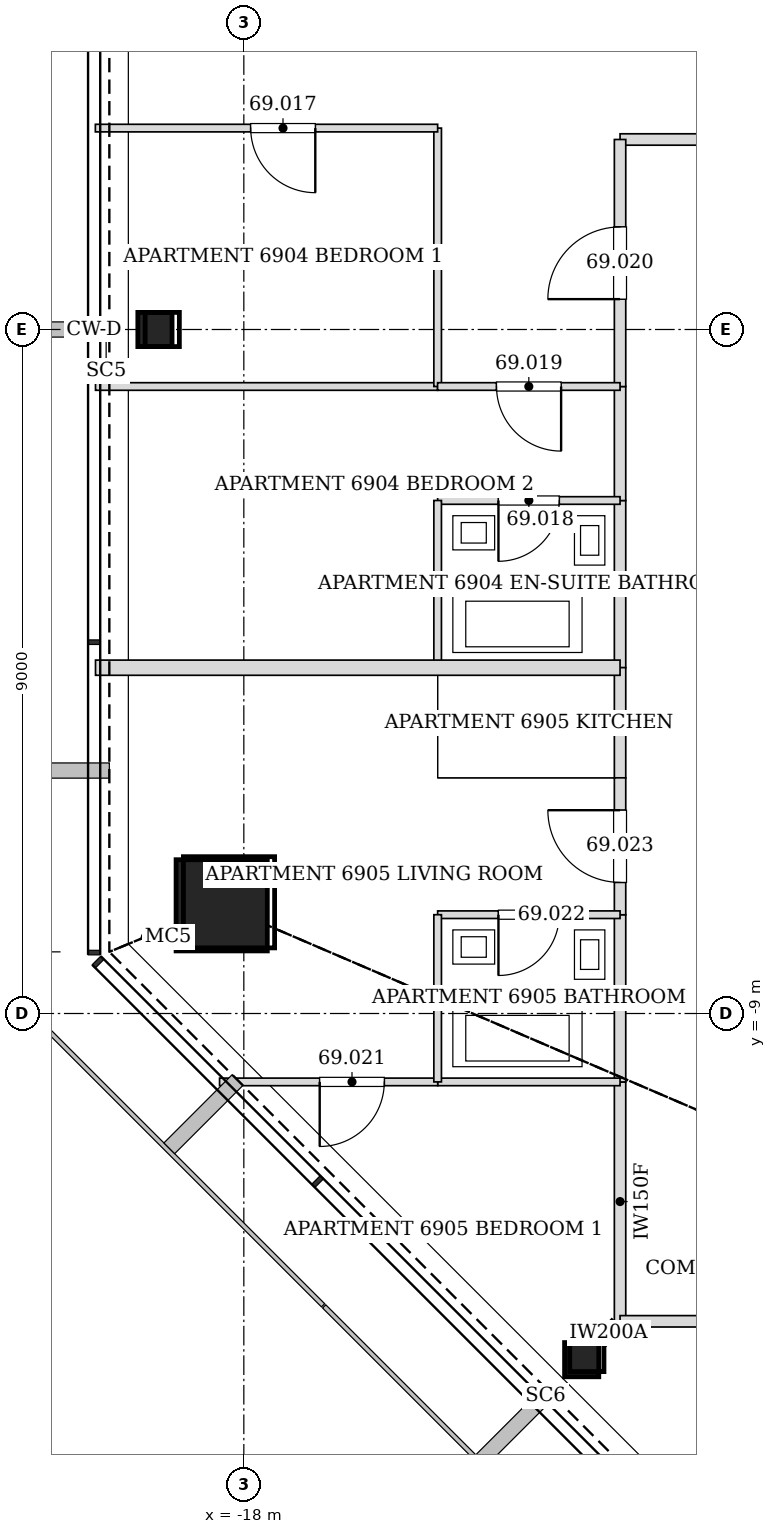
"""IFC4 building model, lengths in metres.
Left out: names, types, materials, properties, quantities, classifications, styles, units other than length and angle.
Written with IfcOpenShell. Run it as: python <this file> out.ifc"""

import sys

from ifc_helpers import new_model, si_unit, direction, frame, frame_2d, origin, origin_2d, place, context, subcontext, project, spatial, rectangle, hollow_rectangle, extrude, element, fill, save


model = new_model("IFC4")
c1 = context("Model", 3, precision=1e-05, world=origin(), true_north=direction((0.0, 1.0)))
c2 = subcontext(c1, "Body", "Model", "MODEL_VIEW")
j1 = project(units=[si_unit("LENGTHUNIT", "METRE"), si_unit("PLANEANGLEUNIT", "RADIAN")], contexts=[c1])
p1 = place(None, origin())
s1 = spatial("IfcSite", under=j1, at=p1, CompositionType="ELEMENT")
p2 = place(p1, origin())
s2 = spatial("IfcBuilding", under=s1, at=p2, CompositionType="ELEMENT")
p3 = place(p2, frame((0.0, 0.0, 284.4)))
s3 = spatial("IfcBuildingStorey", under=s2, at=p3, CompositionType="ELEMENT", Elevation=284.4)
p4 = place(p3, frame((-18.291, -7.576, 0.0), z_axis=(0.028277121884, 0.011698403216, 0.999531666202), x_axis=(-0.382282742426, 0.924045401938, 0.0)))
e1 = element("IfcColumn", 1, at=p4, inside=s3, PredefinedType="COLUMN", context=c2, shape_type="SweptSolid", body=[
    extrude(hollow_rectangle(XDim=1.2, YDim=1.2, WallThickness=0.055, at=origin_2d()), origin(), (0.0, 0.0, 1.0), 3.402),
])
for number, where, z_axis, x_axis in (
    (2, (-19.169, 0.0, 0.0), (0.028, 0.0, 1.0), (0.0, 1.0, 0.0)),
    (3, (-13.555, -13.555, 0.0), (0.02, 0.02, 1.0), (-0.707, 0.707, 0.0)),
):
    element("IfcColumn", number, at=place(p3, frame(where, z_axis=z_axis, x_axis=x_axis)), inside=s3, PredefinedType="COLUMN", context=c2, shape_type="SweptSolid", body=[
        extrude(hollow_rectangle(XDim=0.45, YDim=0.45, WallThickness=0.02, at=origin_2d()), origin(), (0.0, 0.0, 1.0), 3.402),
    ])
p5 = place(p3, frame((-13.05, -2.249, 0.0), z_axis=(0.0, 0.0, 1.0), x_axis=(0.0, -1.0, 0.0)))
e4 = element("IfcWall", 4, at=p5, inside=s3, PredefinedType="PARTITIONING", context=c2, shape_type="SweptSolid", body=[
    extrude(rectangle(XDim=2.202, YDim=0.15, at=frame_2d((1.101, 0.0))), origin(), (0.0, 0.0, 1.0), 3.2),
])
p6 = place(p3, frame((-13.05, -0.749, 0.0), z_axis=(0.0, 0.0, 1.0), x_axis=(0.0, -1.0, 0.0)))
e5 = element("IfcWall", 5, at=p6, inside=s3, PredefinedType="PARTITIONING", context=c2, shape_type="SweptSolid", body=[
    extrude(rectangle(XDim=1.502, YDim=0.15, at=frame_2d((0.751, 0.0))), origin(), (0.0, 0.0, 1.0), 3.2),
])
p7 = place(p3, frame((-11.25, 2.5, 0.0), z_axis=(0.0, 0.0, 1.0), x_axis=(-1.0, 0.0, 0.0)))
e6 = element("IfcWall", 6, at=p7, inside=s3, PredefinedType="PARTITIONING", context=c2, shape_type="SweptSolid", body=[
    extrude(rectangle(XDim=1.8, YDim=0.15, at=frame_2d((0.9, 0.0))), origin(), (0.0, 0.0, 1.0), 3.2),
])
p8 = place(p3, frame((-13.05, 2.5, 0.0), z_axis=(0.0, 0.0, 1.0), x_axis=(0.0, -1.0, 0.0)))
e7 = element("IfcWall", 7, at=p8, inside=s3, PredefinedType="PARTITIONING", context=c2, shape_type="SweptSolid", body=[
    extrude(rectangle(XDim=3.251, YDim=0.15, at=frame_2d((1.625, 0.0))), origin(), (0.0, 0.0, 1.0), 2.349),
])
p9 = place(p8, frame((1.15, 0.0, 0.0)))
e8 = element("IfcOpeningElement", 8, at=p9, cuts=e7, PredefinedType="OPENING", context=c2, shape_type="SweptSolid", body=[
    extrude(rectangle(XDim=0.95, YDim=2.1, at=frame_2d((0.475, 1.05))), frame((0.0, 0.085, 0.0), z_axis=(0.0, -1.0, 0.0), x_axis=(1.0, 0.0, 0.0)), (0.0, 0.0, 1.0), 0.17),
])
p10 = place(p3, frame((-13.05, -9.899, 0.0), z_axis=(0.0, 0.0, 1.0), x_axis=(0.0, -1.0, 0.0)))
e9 = element("IfcWall", 9, at=p10, inside=s3, PredefinedType="PARTITIONING", context=c2, shape_type="SweptSolid", body=[
    extrude(rectangle(XDim=3.151, YDim=0.15, at=frame_2d((1.576, 0.0))), origin(), (0.0, 0.0, 1.0), 2.497),
])
p11 = place(p3, frame((-13.05, -7.699, 0.0), z_axis=(0.0, 0.0, 1.0), x_axis=(0.0, -1.0, 0.0)))
e10 = element("IfcWall", 10, at=p11, inside=s3, PredefinedType="PARTITIONING", context=c2, shape_type="SweptSolid", body=[
    extrude(rectangle(XDim=2.202, YDim=0.15, at=frame_2d((1.101, 0.0))), origin(), (0.0, 0.0, 1.0), 2.497),
])
p12 = place(p3, frame((-13.05, -4.449, 0.0), z_axis=(0.0, 0.0, 1.0), x_axis=(0.0, -1.0, 0.0)))
e11 = element("IfcWall", 11, at=p12, inside=s3, PredefinedType="PARTITIONING", context=c2, shape_type="SweptSolid", body=[
    extrude(rectangle(XDim=1.452, YDim=0.15, at=frame_2d((0.726, 0.0))), origin(), (0.0, 0.0, 1.0), 3.2),
])
p13 = place(p3, frame((-13.05, -5.899, 0.0), z_axis=(0.0, 0.0, 1.0), x_axis=(0.0, -1.0, 0.0)))
e12 = element("IfcWall", 12, at=p13, inside=s3, PredefinedType="PARTITIONING", context=c2, shape_type="SweptSolid", body=[
    extrude(rectangle(XDim=1.802, YDim=0.15, at=frame_2d((0.901, 0.0))), origin(), (0.0, 0.0, 1.0), 3.2),
])
p14 = place(p13, frame((0.426, 0.0, 0.0)))
e13 = element("IfcOpeningElement", 13, at=p14, cuts=e12, PredefinedType="OPENING", context=c2, shape_type="SweptSolid", body=[
    extrude(rectangle(XDim=0.95, YDim=2.1, at=frame_2d((0.475, 1.05))), frame((0.0, 0.085, 0.0), z_axis=(0.0, -1.0, 0.0), x_axis=(1.0, 0.0, 0.0)), (0.0, 0.0, 1.0), 0.17),
])
p15 = place(p3, frame((-13.05, -13.05, 0.0), z_axis=(0.0, 0.0, 1.0), x_axis=(1.0, 0.0, 0.0)))
e14 = element("IfcWall", 14, at=p15, inside=s3, PredefinedType="PARTITIONING", context=c2, shape_type="SweptSolid", body=[
    extrude(rectangle(XDim=4.101, YDim=0.15, at=frame_2d((2.051, 0.0))), origin(), (0.0, 0.0, 1.0), 2.497),
])
p16 = place(p3, frame((-19.951, -0.75, 0.0), z_axis=(0.0, 0.0, 1.0), x_axis=(1.0, 0.0, 0.0)))
e15 = element("IfcWall", 15, at=p16, inside=s3, PredefinedType="PARTITIONING", context=c2, shape_type="SweptSolid", body=[
    extrude(rectangle(XDim=4.501, YDim=0.1, at=frame_2d((2.251, 0.0))), origin(), (0.0, 0.0, 1.0), 2.591),
])
p17 = place(p3, frame((-15.45, -0.75, 0.0), z_axis=(0.0, 0.0, 1.0), x_axis=(0.0, 1.0, 0.0)))
e16 = element("IfcWall", 16, at=p17, inside=s3, PredefinedType="PARTITIONING", context=c2, shape_type="SweptSolid", body=[
    extrude(rectangle(XDim=3.4, YDim=0.1, at=frame_2d((1.7, 0.0))), origin(), (0.0, 0.0, 1.0), 2.349),
])
p18 = place(p3, frame((-15.45, 2.65, 0.0), z_axis=(0.0, 0.0, 1.0), x_axis=(-1.0, 0.0, 0.0)))
e17 = element("IfcWall", 17, at=p18, inside=s3, PredefinedType="PARTITIONING", context=c2, shape_type="SweptSolid", body=[
    extrude(rectangle(XDim=4.503, YDim=0.1, at=frame_2d((2.252, 0.0))), origin(), (0.0, 0.0, 1.0), 2.591),
])
p19 = place(p18, frame((1.61, 0.0, 0.0)))
e18 = element("IfcOpeningElement", 18, at=p19, cuts=e17, PredefinedType="OPENING", context=c2, shape_type="SweptSolid", body=[
    extrude(rectangle(XDim=0.85, YDim=2.1, at=frame_2d((0.425, 1.05))), frame((0.0, 0.06, 0.0), z_axis=(0.0, -1.0, 0.0), x_axis=(1.0, 0.0, 0.0)), (0.0, 0.0, 1.0), 0.12),
])
p20 = place(p3, frame((-13.05, -2.25, 0.0), z_axis=(0.0, 0.0, 1.0), x_axis=(-1.0, 0.0, 0.0)))
e19 = element("IfcWall", 19, at=p20, inside=s3, PredefinedType="PARTITIONING", context=c2, shape_type="SweptSolid", body=[
    extrude(rectangle(XDim=2.4, YDim=0.1, at=frame_2d((1.2, 0.0))), origin(), (0.0, 0.0, 1.0), 2.591),
])
p21 = place(p20, frame((0.8, 0.0, 0.0)))
e20 = element("IfcOpeningElement", 20, at=p21, cuts=e19, PredefinedType="OPENING", context=c2, shape_type="SweptSolid", body=[
    extrude(rectangle(XDim=0.8, YDim=2.1, at=frame_2d((0.4, 1.05))), frame((0.0, 0.06, 0.0), z_axis=(0.0, -1.0, 0.0), x_axis=(1.0, 0.0, 0.0)), (0.0, 0.0, 1.0), 0.12),
])
p22 = place(p3, frame((-15.45, -2.25, 0.0), z_axis=(0.0, 0.0, 1.0), x_axis=(0.0, -1.0, 0.0)))
e21 = element("IfcWall", 21, at=p22, inside=s3, PredefinedType="PARTITIONING", context=c2, shape_type="SweptSolid", body=[
    extrude(rectangle(XDim=2.2, YDim=0.1, at=frame_2d((1.1, 0.0))), origin(), (0.0, 0.0, 1.0), 3.2),
])
p23 = place(p3, frame((-13.05, -4.45, 0.0), z_axis=(0.0, 0.0, 1.0), x_axis=(-1.0, 0.0, 0.0)))
e22 = element("IfcWall", 22, at=p23, inside=s3, PredefinedType="PARTITIONING", context=c2, shape_type="SweptSolid", body=[
    extrude(rectangle(XDim=6.901, YDim=0.2, at=frame_2d((3.451, 0.0))), origin(), (0.0, 0.0, 1.0), 2.591),
])
p24 = place(p3, frame((-13.05, -0.75, 0.0), z_axis=(0.0, 0.0, 1.0), x_axis=(-1.0, 0.0, 0.0)))
e23 = element("IfcWall", 23, at=p24, inside=s3, PredefinedType="PARTITIONING", context=c2, shape_type="SweptSolid", body=[
    extrude(rectangle(XDim=2.401, YDim=0.1, at=frame_2d((1.2, 0.0))), origin(), (0.0, 0.0, 1.0), 2.591),
])
p25 = place(p24, frame((0.775, 0.0, 0.0)))
e24 = element("IfcOpeningElement", 24, at=p25, cuts=e23, PredefinedType="OPENING", context=c2, shape_type="SweptSolid", body=[
    extrude(rectangle(XDim=0.85, YDim=2.1, at=frame_2d((0.425, 1.05))), frame((0.0, 0.06, 0.0), z_axis=(0.0, -1.0, 0.0), x_axis=(1.0, 0.0, 0.0)), (0.0, 0.0, 1.0), 0.12),
])
p26 = place(p3, frame((-13.05, -9.9, 0.0), z_axis=(0.0, 0.0, 1.0), x_axis=(-1.0, 0.0, 0.0)))
e25 = element("IfcWall", 25, at=p26, inside=s3, PredefinedType="PARTITIONING", context=c2, shape_type="SweptSolid", body=[
    extrude(rectangle(XDim=2.401, YDim=0.1, at=frame_2d((1.2, 0.0))), origin(), (0.0, 0.0, 1.0), 2.497),
])
p27 = place(p3, frame((-15.449, -9.9, 0.0), z_axis=(0.0, 0.0, 1.0), x_axis=(-1.0, 0.0, 0.0)))
e26 = element("IfcWall", 26, at=p27, inside=s3, PredefinedType="PARTITIONING", context=c2, shape_type="SweptSolid", body=[
    extrude(rectangle(XDim=2.87, YDim=0.1, at=frame_2d((1.435, 0.0))), origin(), (0.0, 0.0, 1.0), 2.74),
])
p28 = place(p27, frame((0.703, 0.0, 0.0)))
e27 = element("IfcOpeningElement", 27, at=p28, cuts=e26, PredefinedType="OPENING", context=c2, shape_type="SweptSolid", body=[
    extrude(rectangle(XDim=0.85, YDim=2.1, at=frame_2d((0.425, 1.05))), frame((0.0, 0.06, 0.0), z_axis=(0.0, -1.0, 0.0), x_axis=(1.0, 0.0, 0.0)), (0.0, 0.0, 1.0), 0.12),
])
p29 = place(p3, frame((-13.314, -13.314, 0.0), z_axis=(0.0, 0.0, 1.0), x_axis=(0.707106781187, 0.707106781187, 0.0)))
e28 = element("IfcWall", 28, at=p29, inside=s3, PredefinedType="PARTITIONING", context=c2, shape_type="SweptSolid", body=[
    extrude(rectangle(XDim=0.321, YDim=0.2, at=frame_2d((0.16, 0.0))), origin(), (0.0, 0.0, 1.0), 2.591),
])
p30 = place(p3, frame((-13.05, -7.7, 0.0), z_axis=(0.0, 0.0, 1.0), x_axis=(-1.0, 0.0, 0.0)))
e29 = element("IfcWall", 29, at=p30, inside=s3, PredefinedType="PARTITIONING", context=c2, shape_type="SweptSolid", body=[
    extrude(rectangle(XDim=2.4, YDim=0.1, at=frame_2d((1.2, 0.0))), origin(), (0.0, 0.0, 1.0), 2.591),
])
p31 = place(p30, frame((0.8, 0.0, 0.0)))
e30 = element("IfcOpeningElement", 30, at=p31, cuts=e29, PredefinedType="OPENING", context=c2, shape_type="SweptSolid", body=[
    extrude(rectangle(XDim=0.8, YDim=2.1, at=frame_2d((0.4, 1.05))), frame((0.0, 0.06, 0.0), z_axis=(0.0, -1.0, 0.0), x_axis=(1.0, 0.0, 0.0)), (0.0, 0.0, 1.0), 0.12),
])
p32 = place(p3, frame((-15.45, -7.7, 0.0), z_axis=(0.0, 0.0, 1.0), x_axis=(0.0, -1.0, 0.0)))
e31 = element("IfcWall", 31, at=p32, inside=s3, PredefinedType="PARTITIONING", context=c2, shape_type="SweptSolid", body=[
    extrude(rectangle(XDim=2.2, YDim=0.1, at=frame_2d((1.1, 0.0))), origin(), (0.0, 0.0, 1.0), 2.497),
])
p33 = place(p19, origin())
e32 = element("IfcDoor", 32, at=p33, inside=s3, OperationType="SINGLE_SWING_LEFT", PredefinedType="DOOR", context=c2, shape_type="SweptSolid", body=[
    extrude(rectangle(XDim=0.85, YDim=2.1, at=frame_2d((0.425, 1.05))), frame((0.0, 0.025, 0.0), z_axis=(0.0, -1.0, 0.0), x_axis=(1.0, 0.0, 0.0)), (0.0, 0.0, 1.0), 0.05),
])
fill(e18, e32)
p34 = place(p21, origin())
e33 = element("IfcDoor", 33, at=p34, inside=s3, OperationType="SINGLE_SWING_RIGHT", PredefinedType="DOOR", context=c2, shape_type="SweptSolid", body=[
    extrude(rectangle(XDim=0.8, YDim=2.1, at=frame_2d((0.4, 1.05))), frame((0.0, 0.025, 0.0), z_axis=(0.0, -1.0, 0.0), x_axis=(1.0, 0.0, 0.0)), (0.0, 0.0, 1.0), 0.05),
])
fill(e20, e33)
p35 = place(p25, origin())
e34 = element("IfcDoor", 34, at=p35, inside=s3, OperationType="SINGLE_SWING_LEFT", PredefinedType="DOOR", context=c2, shape_type="SweptSolid", body=[
    extrude(rectangle(XDim=0.85, YDim=2.1, at=frame_2d((0.425, 1.05))), frame((0.0, 0.025, 0.0), z_axis=(0.0, -1.0, 0.0), x_axis=(1.0, 0.0, 0.0)), (0.0, 0.0, 1.0), 0.05),
])
fill(e24, e34)
p36 = place(p9, frame((0.95, 0.0, 0.0), z_axis=(0.0, 0.0, 1.0), x_axis=(-1.0, 0.0, 0.0)))
e35 = element("IfcDoor", 35, at=p36, inside=s3, OperationType="SINGLE_SWING_LEFT", PredefinedType="DOOR", context=c2, shape_type="SweptSolid", body=[
    extrude(rectangle(XDim=0.95, YDim=2.1, at=frame_2d((0.475, 1.05))), frame((0.0, 0.025, 0.0), z_axis=(0.0, -1.0, 0.0), x_axis=(1.0, 0.0, 0.0)), (0.0, 0.0, 1.0), 0.05),
])
fill(e8, e35)
p37 = place(p28, origin())
e36 = element("IfcDoor", 36, at=p37, inside=s3, OperationType="SINGLE_SWING_RIGHT", PredefinedType="DOOR", context=c2, shape_type="SweptSolid", body=[
    extrude(rectangle(XDim=0.85, YDim=2.1, at=frame_2d((0.425, 1.05))), frame((0.0, 0.025, 0.0), z_axis=(0.0, -1.0, 0.0), x_axis=(1.0, 0.0, 0.0)), (0.0, 0.0, 1.0), 0.05),
])
fill(e27, e36)
p38 = place(p31, origin())
e37 = element("IfcDoor", 37, at=p38, inside=s3, OperationType="SINGLE_SWING_RIGHT", PredefinedType="DOOR", context=c2, shape_type="SweptSolid", body=[
    extrude(rectangle(XDim=0.8, YDim=2.1, at=frame_2d((0.4, 1.05))), frame((0.0, 0.025, 0.0), z_axis=(0.0, -1.0, 0.0), x_axis=(1.0, 0.0, 0.0)), (0.0, 0.0, 1.0), 0.05),
])
fill(e30, e37)
p39 = place(p14, frame((0.95, 0.0, 0.0), z_axis=(0.0, 0.0, 1.0), x_axis=(-1.0, 0.0, 0.0)))
e38 = element("IfcDoor", 38, at=p39, inside=s3, OperationType="SINGLE_SWING_RIGHT", PredefinedType="DOOR", context=c2, shape_type="SweptSolid", body=[
    extrude(rectangle(XDim=0.95, YDim=2.1, at=frame_2d((0.475, 1.05))), frame((0.0, 0.025, 0.0), z_axis=(0.0, -1.0, 0.0), x_axis=(1.0, 0.0, 0.0)), (0.0, 0.0, 1.0), 0.05),
])
fill(e13, e38)
save(model, sys.argv[1])
